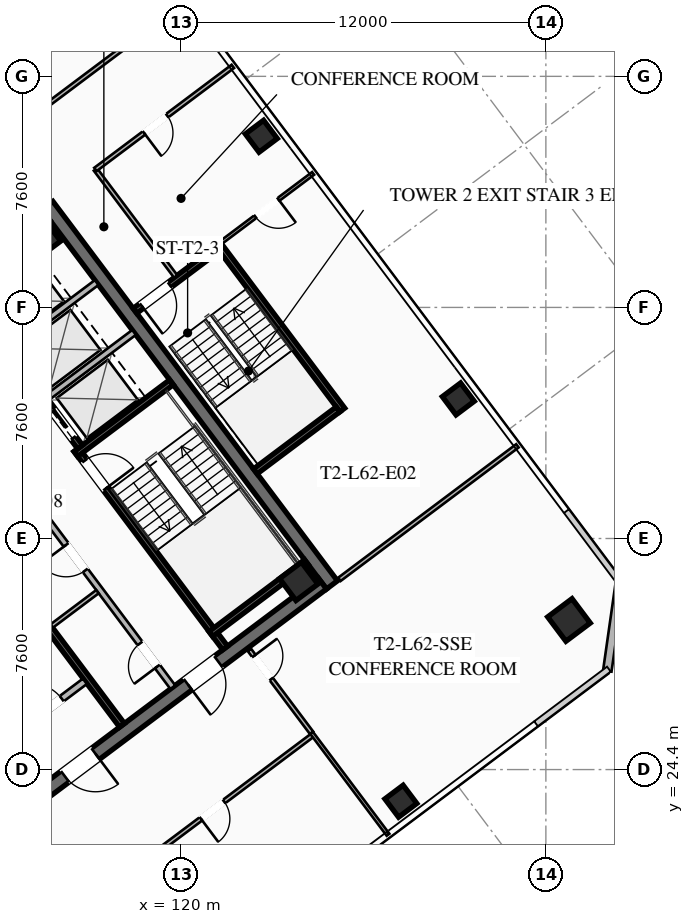
"""IFC4 building model, lengths in metres.
Left out: names, types, materials, properties, quantities, classifications, styles, units other than length and angle.
Written with IfcOpenShell. Run it as: python <this file> out.ifc"""

import sys

from ifc_helpers import new_model, si_unit, direction, frame, frame_2d, origin, origin_2d, place, context, subcontext, project, spatial, rectangle, hollow_rectangle, extrude, element, fill, save


model = new_model("IFC4")
c1 = context("Model", 3, precision=1e-05, world=origin(), true_north=direction((0.0, 1.0)))
c2 = subcontext(c1, "Body", "Model", "MODEL_VIEW")
j1 = project(units=[si_unit("LENGTHUNIT", "METRE"), si_unit("PLANEANGLEUNIT", "RADIAN")], contexts=[c1])
p1 = place(None, origin())
s1 = spatial("IfcSite", under=j1, at=p1, CompositionType="ELEMENT")
p2 = place(p1, origin())
s2 = spatial("IfcBuilding", under=s1, at=p2, CompositionType="ELEMENT")
p3 = place(p2, frame((0.0, 0.0, 229.05)))
s3 = spatial("IfcBuildingStorey", under=s2, at=p3, CompositionType="ELEMENT", Elevation=229.05)
p4 = place(p3, frame((115.604, 42.953, 0.0), z_axis=(0.0, 0.0, 1.0), x_axis=(0.600005007985, -0.799996243986, 0.0)))
e1 = element("IfcWall", 1, at=p4, inside=s3, PredefinedType="SHEAR", context=c2, shape_type="SweptSolid", body=[
    extrude(rectangle(XDim=15.6, YDim=0.45, at=frame_2d((7.8, 0.0))), origin(), (0.0, 0.0, 1.0), 3.55),
])
p5 = place(p3, frame((124.649, 30.518, 0.0), z_axis=(0.0, 0.0, 1.0), x_axis=(-0.8, -0.6, 0.0)))
e2 = element("IfcWall", 2, at=p5, inside=s3, PredefinedType="SHEAR", context=c2, shape_type="SweptSolid", body=[
    extrude(rectangle(XDim=15.26, YDim=0.45, at=frame_2d((7.63, 0.0))), origin(), (0.0, 0.0, 1.0), 3.55),
])
p6 = place(p5, frame((9.33, 0.0, 0.0)))
e3 = element("IfcOpeningElement", 3, at=p6, cuts=e2, PredefinedType="OPENING", context=c2, shape_type="SweptSolid", body=[
    extrude(rectangle(XDim=1.25, YDim=2.25, at=frame_2d((0.625, 1.125))), frame((0.0, 0.235, 0.0), z_axis=(0.0, -1.0, 0.0), x_axis=(1.0, 0.0, 0.0)), (0.0, 0.0, 1.0), 0.47),
])
p7 = place(p5, frame((4.28, 0.0, 0.0)))
e4 = element("IfcOpeningElement", 4, at=p7, cuts=e2, PredefinedType="OPENING", context=c2, shape_type="SweptSolid", body=[
    extrude(rectangle(XDim=1.25, YDim=2.25, at=frame_2d((0.625, 1.125))), frame((0.0, 0.235, 0.0), z_axis=(0.0, -1.0, 0.0), x_axis=(1.0, 0.0, 0.0)), (0.0, 0.0, 1.0), 0.47),
])
for number, where, z_axis, x_axis in (
    (5, (123.87, 30.59, 0.0), (0.0, 0.0, 1.0), (0.8, 0.6, 0.0)),
    (6, (115.41, 41.87, 0.0), (0.0, 0.0, 1.0), (0.8, 0.6, 0.0)),
):
    element("IfcColumn", number, at=place(p3, frame(where, z_axis=z_axis, x_axis=x_axis)), inside=s3, PredefinedType="COLUMN", context=c2, shape_type="SweptSolid", body=[
        extrude(hollow_rectangle(XDim=0.9, YDim=0.9, WallThickness=0.04, at=origin_2d()), origin(), (0.0, 0.0, 1.0), 3.37),
    ])
p8 = place(p3, frame((132.76, 29.32, 0.0), z_axis=(0.0, 0.0, 1.0), x_axis=(0.799999996291, 0.600000004945, 0.0)))
e7 = element("IfcColumn", 7, at=p8, inside=s3, PredefinedType="COLUMN", context=c2, shape_type="SweptSolid", body=[
    extrude(hollow_rectangle(XDim=1.0, YDim=1.0, WallThickness=0.04, at=origin_2d()), origin(), (0.0, 0.0, 1.0), 3.37),
])
for number, where, z_axis, x_axis in (
    (8, (127.23, 23.36, 0.0), (0.0, 0.0, 1.0), (0.8, 0.6, 0.0)),
    (9, (129.12, 36.59, 0.0), (0.0, 0.0, 1.0), (0.8, 0.6, 0.0)),
    (10, (122.64, 45.23, 0.0), (0.0, 0.0, 1.0), (0.8, 0.6, 0.0)),
):
    element("IfcColumn", number, at=place(p3, frame(where, z_axis=z_axis, x_axis=x_axis)), inside=s3, PredefinedType="COLUMN", context=c2, shape_type="SweptSolid", body=[
        extrude(hollow_rectangle(XDim=0.75, YDim=0.75, WallThickness=0.032, at=origin_2d()), origin(), (0.0, 0.0, 1.0), 3.37),
    ])
p9 = place(p3, frame((134.44, 30.58, 0.0), z_axis=(0.0, 0.0, 1.0), x_axis=(-0.14138683146, -0.989954425158, 0.0)))
e11 = element("IfcWall", 11, at=p9, inside=s3, PredefinedType="SOLIDWALL", context=c2, shape_type="SweptSolid", body=[
    extrude(rectangle(XDim=2.97, YDim=0.28, at=frame_2d((1.485, 0.0))), origin(), (0.0, 0.0, 1.0), 3.37),
])
p10 = place(p3, frame((116.56, 34.92, 0.0), z_axis=(0.0, 0.0, 1.0), x_axis=(0.59999041401, -0.800007189403, 0.0)))
e12 = element("IfcWall", 12, at=p10, inside=s3, PredefinedType="SHEAR", context=c2, shape_type="SweptSolid", body=[
    extrude(rectangle(XDim=8.15, YDim=0.2, at=frame_2d((4.075, 0.0))), origin(), (0.0, 0.0, 1.0), 3.37),
])
p11 = place(p10, frame((0.45, 0.0, 0.0)))
e13 = element("IfcOpeningElement", 13, at=p11, cuts=e12, PredefinedType="OPENING", context=c2, shape_type="SweptSolid", body=[
    extrude(rectangle(XDim=1.15, YDim=2.2, at=frame_2d((0.575, 1.1))), frame((0.0, 0.11, 0.0), z_axis=(0.0, -1.0, 0.0), x_axis=(1.0, 0.0, 0.0)), (0.0, 0.0, 1.0), 0.22),
])
for number, where, z_axis, x_axis in (
    (14, (116.54, 34.78, 0.0), (0.0, 0.0, 1.0), (0.8, 0.6, 0.0)),
    (15, (120.98, 28.86, 0.0), (0.0, 0.0, 1.0), (0.8, 0.6, 0.0)),
):
    element("IfcWall", number, at=place(p3, frame(where, z_axis=z_axis, x_axis=x_axis)), inside=s3, PredefinedType="SHEAR", context=c2, shape_type="SweptSolid", body=[
        extrude(rectangle(XDim=3.93, YDim=0.2, at=frame_2d((1.965, 0.0))), origin(), (0.0, 0.0, 1.0), 3.37),
    ])
p12 = place(p3, frame((118.058, 25.856, 0.0), z_axis=(0.0, 0.0, 1.0), x_axis=(-0.600002657301, 0.799998007018, 0.0)))
e16 = element("IfcWall", 16, at=p12, inside=s3, PredefinedType="SHEAR", context=c2, shape_type="SweptSolid", body=[
    extrude(rectangle(XDim=14.7, YDim=0.2, at=frame_2d((7.35, 0.0))), origin(), (0.0, 0.0, 1.0), 3.37),
])
p13 = place(p3, frame((114.316, 25.412, 0.0), z_axis=(0.0, 0.0, 1.0), x_axis=(0.800018601094, 0.59997519774, 0.0)))
e17 = element("IfcWall", 17, at=p13, inside=s3, PredefinedType="SOLIDWALL", context=c2, shape_type="SweptSolid", body=[
    extrude(rectangle(XDim=3.15, YDim=0.22, at=frame_2d((1.575, 0.0))), origin(), (0.0, 0.0, 1.0), 2.513),
])
p14 = place(p13, frame((0.95, 0.0, 0.0)))
e18 = element("IfcOpeningElement", 18, at=p14, cuts=e17, PredefinedType="OPENING", context=c2, shape_type="SweptSolid", body=[
    extrude(rectangle(XDim=1.25, YDim=2.25, at=frame_2d((0.625, 1.125))), frame((0.0, 0.12, 0.0), z_axis=(0.0, -1.0, 0.0), x_axis=(1.0, 0.0, 0.0)), (0.0, 0.0, 1.0), 0.24),
])
p15 = place(p3, frame((112.75, 40.25, 0.0), z_axis=(0.0, 0.0, 1.0), x_axis=(0.599994036198, -0.800004472816, 0.0)))
e19 = element("IfcWall", 19, at=p15, inside=s3, PredefinedType="SHEAR", context=c2, shape_type="SweptSolid", body=[
    extrude(rectangle(XDim=6.55, YDim=0.2, at=frame_2d((3.275, 0.0))), origin(), (0.0, 0.0, 1.0), 3.37),
])
p16 = place(p15, frame((5.075, 0.0, 0.0)))
e20 = element("IfcOpeningElement", 20, at=p16, cuts=e19, PredefinedType="OPENING", context=c2, shape_type="SweptSolid", body=[
    extrude(rectangle(XDim=1.1, YDim=2.2, at=frame_2d((0.55, 1.1))), frame((0.0, 0.11, 0.0), z_axis=(0.0, -1.0, 0.0), x_axis=(1.0, 0.0, 0.0)), (0.0, 0.0, 1.0), 0.22),
])
p17 = place(p15, frame((3.025, 0.0, 0.0)))
e21 = element("IfcOpeningElement", 21, at=p17, cuts=e19, PredefinedType="OPENING", context=c2, shape_type="SweptSolid", body=[
    extrude(rectangle(XDim=1.1, YDim=2.2, at=frame_2d((0.55, 1.1))), frame((0.0, 0.11, 0.0), z_axis=(0.0, -1.0, 0.0), x_axis=(1.0, 0.0, 0.0)), (0.0, 0.0, 1.0), 0.22),
])
p18 = place(p15, frame((1.025, 0.0, 0.0)))
e22 = element("IfcOpeningElement", 22, at=p18, cuts=e19, PredefinedType="OPENING", context=c2, shape_type="SweptSolid", body=[
    extrude(rectangle(XDim=1.1, YDim=2.2, at=frame_2d((0.55, 1.1))), frame((0.0, 0.11, 0.0), z_axis=(0.0, -1.0, 0.0), x_axis=(1.0, 0.0, 0.0)), (0.0, 0.0, 1.0), 0.22),
])
for number, where, z_axis, x_axis in (
    (23, (115.59, 36.63, 0.0), (0.0, 0.0, 1.0), (0.8, 0.6, 0.0)),
    (24, (114.36, 38.27, 0.0), (0.0, 0.0, 1.0), (0.8, 0.6, 0.0)),
):
    element("IfcWall", number, at=place(p3, frame(where, z_axis=z_axis, x_axis=x_axis)), inside=s3, PredefinedType="SOLIDWALL", context=c2, shape_type="SweptSolid", body=[
        extrude(rectangle(XDim=3.58, YDim=0.2, at=frame_2d((1.79, 0.0))), origin(), (0.0, 0.0, 1.0), 3.37),
    ])
p19 = place(p3, frame((119.73, 27.11, 0.0), z_axis=(0.0, 0.0, 1.0), x_axis=(-0.600005580459, 0.799995814625, 0.0)))
e25 = element("IfcWall", 25, at=p19, inside=s3, PredefinedType="SOLIDWALL", context=c2, shape_type="SweptSolid", body=[
    extrude(rectangle(XDim=7.0, YDim=0.2, at=frame_2d((3.5, 0.0))), origin(), (0.0, 0.0, 1.0), 2.513),
])
p20 = place(p19, frame((0.85, 0.0, 0.0)))
e26 = element("IfcOpeningElement", 26, at=p20, cuts=e25, PredefinedType="OPENING", context=c2, shape_type="SweptSolid", body=[
    extrude(rectangle(XDim=0.95, YDim=2.05, at=frame_2d((0.475, 1.025))), frame((0.0, 0.11, 0.0), z_axis=(0.0, -1.0, 0.0), x_axis=(1.0, 0.0, 0.0)), (0.0, 0.0, 1.0), 0.22),
])
p21 = place(p19, frame((4.8, 0.0, 0.0)))
e27 = element("IfcOpeningElement", 27, at=p21, cuts=e25, PredefinedType="OPENING", context=c2, shape_type="SweptSolid", body=[
    extrude(rectangle(XDim=1.05, YDim=2.2, at=frame_2d((0.525, 1.1))), frame((0.0, 0.11, 0.0), z_axis=(0.0, -1.0, 0.0), x_axis=(1.0, 0.0, 0.0)), (0.0, 0.0, 1.0), 0.22),
])
p22 = place(p3, frame((115.746, 29.122, 0.0), z_axis=(0.0, 0.0, 1.0), x_axis=(0.8, 0.6, 0.0)))
e28 = element("IfcWall", 28, at=p22, inside=s3, PredefinedType="PARTITIONING", context=c2, shape_type="SweptSolid", body=[
    extrude(rectangle(XDim=1.88, YDim=0.135, at=frame_2d((0.94, 0.0))), origin(), (0.0, 0.0, 1.0), 2.513),
])
p23 = place(p3, frame((125.304, 36.228, 0.0), z_axis=(0.0, 0.0, 1.0), x_axis=(-0.59998851072, 0.800008616831, 0.0)))
e29 = element("IfcWall", 29, at=p23, inside=s3, PredefinedType="SHEAR", context=c2, shape_type="SweptSolid", body=[
    extrude(rectangle(XDim=6.8, YDim=0.2, at=frame_2d((3.4, 0.0))), origin(), (0.0, 0.0, 1.0), 3.37),
])
p24 = place(p3, frame((121.204, 41.528, 0.0), z_axis=(0.0, 0.0, 1.0), x_axis=(-0.800017232136, -0.599977023131, 0.0)))
e30 = element("IfcWall", 30, at=p24, inside=s3, PredefinedType="SHEAR", context=c2, shape_type="SweptSolid", body=[
    extrude(rectangle(XDim=3.4, YDim=0.2, at=frame_2d((1.7, 0.0))), origin(), (0.0, 0.0, 1.0), 3.37),
])
p25 = place(p24, frame((1.975, 0.0, 0.0)))
e31 = element("IfcOpeningElement", 31, at=p25, cuts=e30, PredefinedType="OPENING", context=c2, shape_type="SweptSolid", body=[
    extrude(rectangle(XDim=1.15, YDim=2.2, at=frame_2d((0.575, 1.1))), frame((0.0, 0.11, 0.0), z_axis=(0.0, -1.0, 0.0), x_axis=(1.0, 0.0, 0.0)), (0.0, 0.0, 1.0), 0.22),
])
p26 = place(p3, frame((122.444, 34.208, 0.0), z_axis=(0.0, 0.0, 1.0), x_axis=(0.79999138319, 0.600011488909, 0.0)))
e32 = element("IfcWall", 32, at=p26, inside=s3, PredefinedType="SHEAR", context=c2, shape_type="SweptSolid", body=[
    extrude(rectangle(XDim=3.4, YDim=0.2, at=frame_2d((1.7, 0.0))), origin(), (0.0, 0.0, 1.0), 3.37),
])
p27 = place(p3, frame((119.824, 40.618, 0.0), z_axis=(0.0, 0.0, 1.0), x_axis=(-0.599982243973, 0.800013316712, 0.0)))
e33 = element("IfcWall", 33, at=p27, inside=s3, PredefinedType="PARTITIONING", context=c2, shape_type="SweptSolid", body=[
    extrude(rectangle(XDim=4.4, YDim=0.135, at=frame_2d((2.2, 0.0))), origin(), (0.0, 0.0, 1.0), 2.513),
])
p28 = place(p3, frame((98.586, 33.502, 0.0), z_axis=(0.0, 0.0, 1.0), x_axis=(0.8, 0.6, 0.0)))
e34 = element("IfcWall", 34, at=p28, inside=s3, PredefinedType="PARTITIONING", context=c2, shape_type="SweptSolid", body=[
    extrude(rectangle(XDim=24.68, YDim=0.135, at=frame_2d((12.34, 0.0))), origin(), (0.0, 0.0, 1.0), 2.513),
])
p29 = place(p28, frame((7.05, 0.0, 0.0)))
e35 = element("IfcOpeningElement", 35, at=p29, cuts=e34, PredefinedType="OPENING", context=c2, shape_type="SweptSolid", body=[
    extrude(rectangle(XDim=0.95, YDim=2.05, at=frame_2d((0.475, 1.025))), frame((0.0, 0.077, 0.0), z_axis=(0.0, -1.0, 0.0), x_axis=(1.0, 0.0, 0.0)), (0.0, 0.0, 1.0), 0.155),
])
p30 = place(p28, frame((11.263, 0.0, 0.0)))
e36 = element("IfcOpeningElement", 36, at=p30, cuts=e34, PredefinedType="OPENING", context=c2, shape_type="SweptSolid", body=[
    extrude(rectangle(XDim=0.95, YDim=2.05, at=frame_2d((0.475, 1.025))), frame((0.0, 0.077, 0.0), z_axis=(0.0, -1.0, 0.0), x_axis=(1.0, 0.0, 0.0)), (0.0, 0.0, 1.0), 0.155),
])
p31 = place(p3, frame((124.342, 25.544, 0.0), z_axis=(0.0, 0.0, 1.0), x_axis=(-0.8, -0.6, 0.0)))
e37 = element("IfcWall", 37, at=p31, inside=s3, PredefinedType="PARTITIONING", context=c2, shape_type="SweptSolid", body=[
    extrude(rectangle(XDim=15.83, YDim=0.135, at=frame_2d((7.915, 0.0))), origin(), (0.0, 0.0, 1.0), 2.513),
])
p32 = place(p31, frame((3.658, 0.0, 0.0)))
e38 = element("IfcOpeningElement", 38, at=p32, cuts=e37, PredefinedType="OPENING", context=c2, shape_type="SweptSolid", body=[
    extrude(rectangle(XDim=0.95, YDim=2.05, at=frame_2d((0.475, 1.025))), frame((0.0, 0.077, 0.0), z_axis=(0.0, -1.0, 0.0), x_axis=(1.0, 0.0, 0.0)), (0.0, 0.0, 1.0), 0.155),
])
p33 = place(p3, frame((122.248, 28.336, 0.0), z_axis=(0.0, 0.0, 1.0), x_axis=(0.599977088934, -0.800017182787, 0.0)))
e39 = element("IfcWall", 39, at=p33, inside=s3, PredefinedType="PARTITIONING", context=c2, shape_type="SweptSolid", body=[
    extrude(rectangle(XDim=3.41, YDim=0.135, at=frame_2d((1.705, 0.0))), origin(), (0.0, 0.0, 1.0), 2.513),
])
p34 = place(p33, frame((0.25, 0.0, 0.0)))
e40 = element("IfcOpeningElement", 40, at=p34, cuts=e39, PredefinedType="OPENING", context=c2, shape_type="SweptSolid", body=[
    extrude(rectangle(XDim=0.95, YDim=2.05, at=frame_2d((0.475, 1.025))), frame((0.0, 0.077, 0.0), z_axis=(0.0, -1.0, 0.0), x_axis=(1.0, 0.0, 0.0)), (0.0, 0.0, 1.0), 0.155),
])
p35 = place(p3, frame((126.808, 22.256, 0.0), z_axis=(0.0, 0.0, 1.0), x_axis=(-0.600046613595, 0.799965037682, 0.0)))
e41 = element("IfcWall", 41, at=p35, inside=s3, PredefinedType="PARTITIONING", context=c2, shape_type="SweptSolid", body=[
    extrude(rectangle(XDim=4.19, YDim=0.11, at=frame_2d((2.095, 0.0))), origin(), (0.0, 0.0, 1.0), 2.513),
])
p36 = place(p3, frame((121.704, 47.528, 0.0), z_axis=(0.0, 0.0, 1.0), x_axis=(-0.799989629485, -0.600013827105, 0.0)))
e42 = element("IfcWall", 42, at=p36, inside=s3, PredefinedType="PARTITIONING", context=c2, shape_type="SweptSolid", body=[
    extrude(rectangle(XDim=5.65, YDim=0.135, at=frame_2d((2.825, 0.0))), origin(), (0.0, 0.0, 1.0), 2.513),
])
p37 = place(p36, frame((2.7, 0.0, 0.0)))
e43 = element("IfcOpeningElement", 43, at=p37, cuts=e42, PredefinedType="OPENING", context=c2, shape_type="SweptSolid", body=[
    extrude(rectangle(XDim=0.95, YDim=2.05, at=frame_2d((0.475, 1.025))), frame((0.0, 0.077, 0.0), z_axis=(0.0, -1.0, 0.0), x_axis=(1.0, 0.0, 0.0)), (0.0, 0.0, 1.0), 0.155),
])
p38 = place(p3, frame((125.208, 30.656, 0.0), z_axis=(0.0, 0.0, 1.0), x_axis=(0.79999199534, 0.600010672732, 0.0)))
e44 = element("IfcWall", 44, at=p38, inside=s3, PredefinedType="PARTITIONING", context=c2, shape_type="SweptSolid", body=[
    extrude(rectangle(XDim=7.32, YDim=0.135, at=frame_2d((3.66, 0.0))), origin(), (0.0, 0.0, 1.0), 2.513),
])
p39 = place(p3, frame((124.344, 44.008, 0.0), z_axis=(0.0, 0.0, 1.0), x_axis=(-0.8, -0.6, 0.0)))
e45 = element("IfcWall", 45, at=p39, inside=s3, PredefinedType="PARTITIONING", context=c2, shape_type="SweptSolid", body=[
    extrude(rectangle(XDim=3.8, YDim=0.11, at=frame_2d((1.9, 0.0))), origin(), (0.0, 0.0, 1.0), 2.513),
])
p40 = place(p39, frame((1.425, 0.0, 0.0)))
e46 = element("IfcOpeningElement", 46, at=p40, cuts=e45, PredefinedType="OPENING", context=c2, shape_type="SweptSolid", body=[
    extrude(rectangle(XDim=0.95, YDim=2.05, at=frame_2d((0.475, 1.025))), frame((0.0, 0.065, 0.0), z_axis=(0.0, -1.0, 0.0), x_axis=(1.0, 0.0, 0.0)), (0.0, 0.0, 1.0), 0.13),
])
p41 = place(p6, origin())
e47 = element("IfcDoor", 47, at=p41, inside=s3, OperationType="SINGLE_SWING_LEFT", PredefinedType="DOOR", context=c2, shape_type="SweptSolid", body=[
    extrude(rectangle(XDim=1.25, YDim=2.25, at=frame_2d((0.625, 1.125))), frame((0.0, 0.025, 0.0), z_axis=(0.0, -1.0, 0.0), x_axis=(1.0, 0.0, 0.0)), (0.0, 0.0, 1.0), 0.05),
])
fill(e3, e47)
p42 = place(p7, origin())
e48 = element("IfcDoor", 48, at=p42, inside=s3, OperationType="SINGLE_SWING_RIGHT", PredefinedType="DOOR", context=c2, shape_type="SweptSolid", body=[
    extrude(rectangle(XDim=1.25, YDim=2.25, at=frame_2d((0.625, 1.125))), frame((0.0, 0.025, 0.0), z_axis=(0.0, -1.0, 0.0), x_axis=(1.0, 0.0, 0.0)), (0.0, 0.0, 1.0), 0.05),
])
fill(e4, e48)
p43 = place(p11, origin())
e49 = element("IfcDoor", 49, at=p43, inside=s3, OperationType="SINGLE_SWING_RIGHT", PredefinedType="DOOR", context=c2, shape_type="SweptSolid", body=[
    extrude(rectangle(XDim=1.15, YDim=2.2, at=frame_2d((0.575, 1.1))), frame((0.0, 0.025, 0.0), z_axis=(0.0, -1.0, 0.0), x_axis=(1.0, 0.0, 0.0)), (0.0, 0.0, 1.0), 0.05),
])
fill(e13, e49)
p44 = place(p14, origin())
e50 = element("IfcDoor", 50, at=p44, inside=s3, OperationType="SINGLE_SWING_LEFT", PredefinedType="DOOR", context=c2, shape_type="SweptSolid", body=[
    extrude(rectangle(XDim=1.25, YDim=2.25, at=frame_2d((0.625, 1.125))), frame((0.0, 0.025, 0.0), z_axis=(0.0, -1.0, 0.0), x_axis=(1.0, 0.0, 0.0)), (0.0, 0.0, 1.0), 0.05),
])
fill(e18, e50)
p45 = place(p20, origin())
e51 = element("IfcDoor", 51, at=p45, inside=s3, OperationType="SINGLE_SWING_LEFT", PredefinedType="DOOR", context=c2, shape_type="SweptSolid", body=[
    extrude(rectangle(XDim=0.95, YDim=2.05, at=frame_2d((0.475, 1.025))), frame((0.0, 0.025, 0.0), z_axis=(0.0, -1.0, 0.0), x_axis=(1.0, 0.0, 0.0)), (0.0, 0.0, 1.0), 0.05),
])
fill(e26, e51)
p46 = place(p21, origin())
e52 = element("IfcDoor", 52, at=p46, inside=s3, OperationType="SINGLE_SWING_RIGHT", PredefinedType="DOOR", context=c2, shape_type="SweptSolid", body=[
    extrude(rectangle(XDim=1.05, YDim=2.2, at=frame_2d((0.525, 1.1))), frame((0.0, 0.025, 0.0), z_axis=(0.0, -1.0, 0.0), x_axis=(1.0, 0.0, 0.0)), (0.0, 0.0, 1.0), 0.05),
])
fill(e27, e52)
p47 = place(p25, origin())
e53 = element("IfcDoor", 53, at=p47, inside=s3, OperationType="SINGLE_SWING_RIGHT", PredefinedType="DOOR", context=c2, shape_type="SweptSolid", body=[
    extrude(rectangle(XDim=1.15, YDim=2.2, at=frame_2d((0.575, 1.1))), frame((0.0, 0.025, 0.0), z_axis=(0.0, -1.0, 0.0), x_axis=(1.0, 0.0, 0.0)), (0.0, 0.0, 1.0), 0.05),
])
fill(e31, e53)
p48 = place(p32, origin())
e54 = element("IfcDoor", 54, at=p48, inside=s3, OperationType="SINGLE_SWING_RIGHT", PredefinedType="DOOR", context=c2, shape_type="SweptSolid", body=[
    extrude(rectangle(XDim=0.95, YDim=2.05, at=frame_2d((0.475, 1.025))), frame((0.0, 0.025, 0.0), z_axis=(0.0, -1.0, 0.0), x_axis=(1.0, 0.0, 0.0)), (0.0, 0.0, 1.0), 0.05),
])
fill(e38, e54)
p49 = place(p34, origin())
e55 = element("IfcDoor", 55, at=p49, inside=s3, OperationType="SINGLE_SWING_LEFT", PredefinedType="DOOR", context=c2, shape_type="SweptSolid", body=[
    extrude(rectangle(XDim=0.95, YDim=2.05, at=frame_2d((0.475, 1.025))), frame((0.0, 0.025, 0.0), z_axis=(0.0, -1.0, 0.0), x_axis=(1.0, 0.0, 0.0)), (0.0, 0.0, 1.0), 0.05),
])
fill(e40, e55)
p50 = place(p37, origin())
e56 = element("IfcDoor", 56, at=p50, inside=s3, OperationType="SINGLE_SWING_RIGHT", PredefinedType="DOOR", context=c2, shape_type="SweptSolid", body=[
    extrude(rectangle(XDim=0.95, YDim=2.05, at=frame_2d((0.475, 1.025))), frame((0.0, 0.025, 0.0), z_axis=(0.0, -1.0, 0.0), x_axis=(1.0, 0.0, 0.0)), (0.0, 0.0, 1.0), 0.05),
])
fill(e43, e56)
p51 = place(p40, origin())
e57 = element("IfcDoor", 57, at=p51, inside=s3, OperationType="SINGLE_SWING_LEFT", PredefinedType="DOOR", context=c2, shape_type="SweptSolid", body=[
    extrude(rectangle(XDim=0.95, YDim=2.05, at=frame_2d((0.475, 1.025))), frame((0.0, 0.025, 0.0), z_axis=(0.0, -1.0, 0.0), x_axis=(1.0, 0.0, 0.0)), (0.0, 0.0, 1.0), 0.05),
])
fill(e46, e57)
p52 = place(p16, origin())
e58 = element("IfcDoor", 58, at=p52, inside=s3, OperationType="SLIDING_TO_LEFT", PredefinedType="DOOR", context=c2, shape_type="SweptSolid", body=[
    extrude(rectangle(XDim=1.1, YDim=2.2, at=frame_2d((0.55, 1.1))), frame((0.0, 0.025, 0.0), z_axis=(0.0, -1.0, 0.0), x_axis=(1.0, 0.0, 0.0)), (0.0, 0.0, 1.0), 0.05),
])
fill(e20, e58)
save(model, sys.argv[1])
